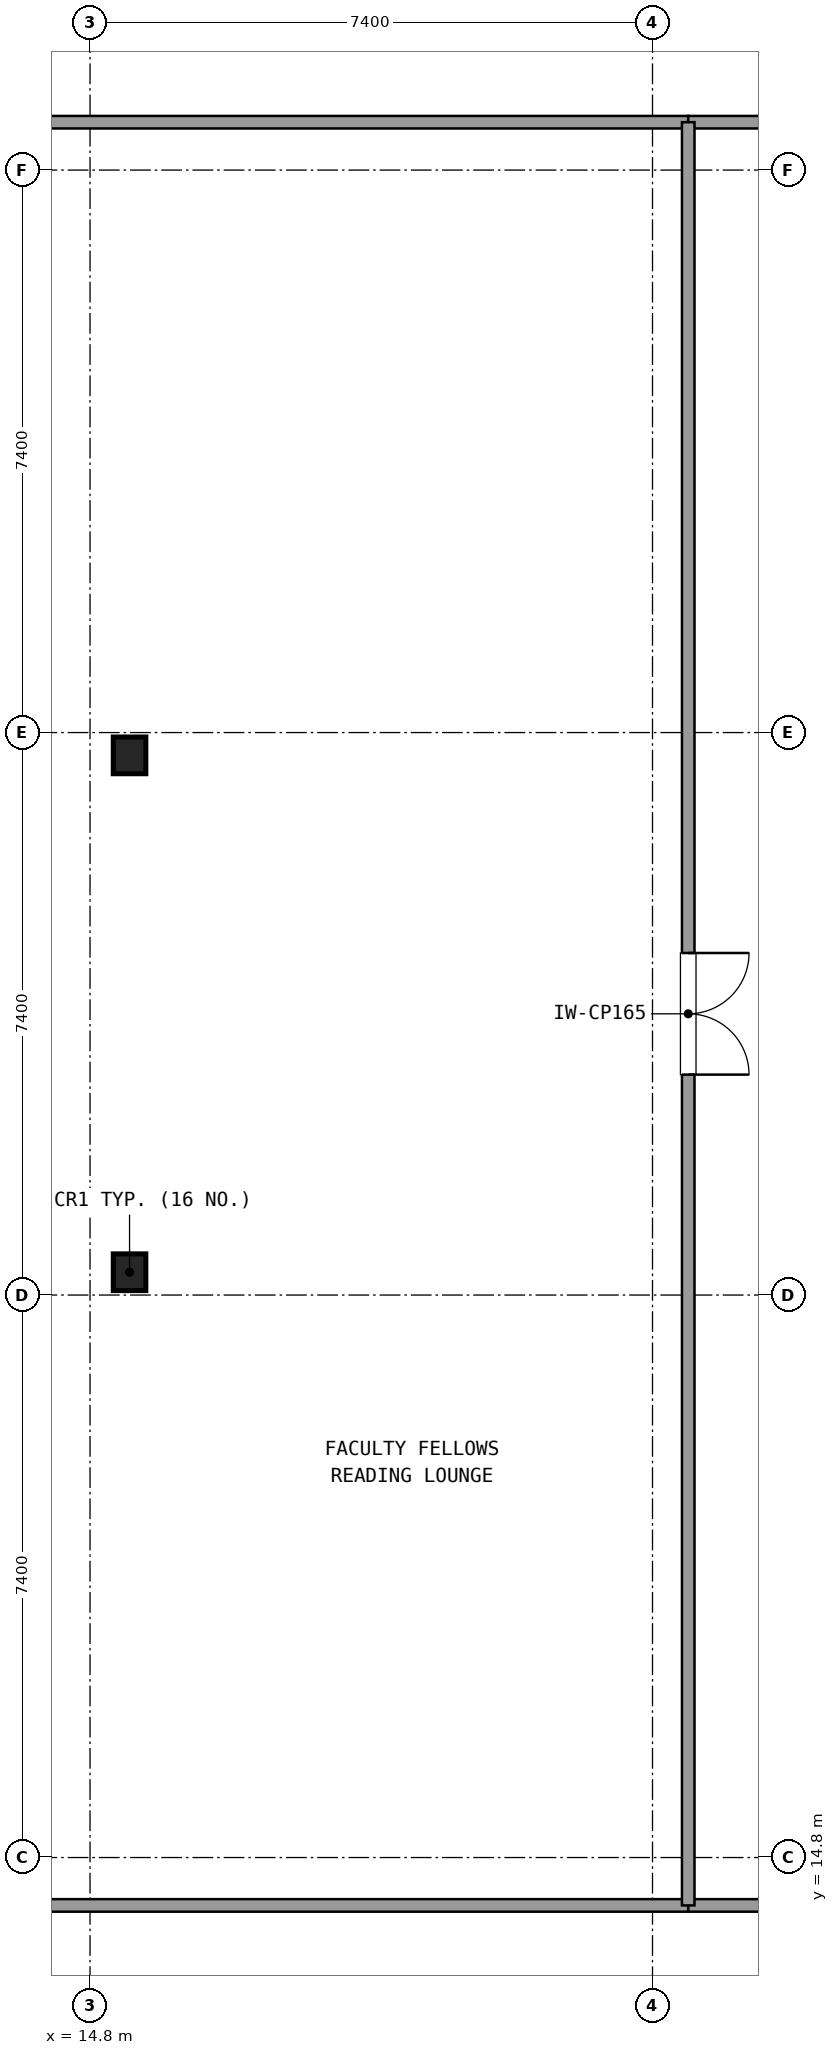
"""IFC4 building model, lengths in metres.
Left out: names, types, materials, properties, quantities, classifications, styles, units other than length and angle.
Written with IfcOpenShell. Run it as: python <this file> out.ifc"""

import sys

from ifc_helpers import new_model, si_unit, direction, frame, frame_2d, origin, origin_2d, place, context, subcontext, project, spatial, rectangle, i_section, extrude, element, fill, save


model = new_model("IFC4")
c1 = context("Model", 3, precision=1e-05, world=origin(), true_north=direction((0.0, 1.0)))
c2 = subcontext(c1, "Body", "Model", "MODEL_VIEW")
j1 = project(units=[si_unit("LENGTHUNIT", "METRE"), si_unit("PLANEANGLEUNIT", "RADIAN")], contexts=[c1])
p1 = place(None, origin())
s1 = spatial("IfcSite", under=j1, at=p1, CompositionType="ELEMENT")
p2 = place(p1, origin())
s2 = spatial("IfcBuilding", under=s1, at=p2, CompositionType="ELEMENT")
p3 = place(p2, frame((0.0, 0.0, 286.02)))
s3 = spatial("IfcBuildingStorey", under=s2, at=p3, CompositionType="ELEMENT", Elevation=286.02)
for number, where, z_axis, x_axis in (
    (1, (15.32, 22.5, 0.0), (0.0, 0.0, 1.0), (1.0, 0.0, 0.0)),
    (2, (15.32, 29.3, 0.0), (0.0, 0.0, 1.0), (1.0, 0.0, 0.0)),
):
    element("IfcColumn", number, at=place(p3, frame(where, z_axis=z_axis, x_axis=x_axis)), inside=s3, PredefinedType="COLUMN", context=c2, shape_type="SweptSolid", body=[
        extrude(i_section(OverallWidth=0.428, OverallDepth=0.483, WebThickness=0.042, FlangeThickness=0.068, at=origin_2d()), origin(), (0.0, 0.0, 1.0), 4.32),
    ])
for number, where, z_axis, x_axis in (
    (3, (14.1, 37.63, 0.0), (0.0, 0.0, 1.0), (1.0, 0.0, 0.0)),
    (4, (14.1, 14.17, 0.0), (0.0, 0.0, 1.0), (1.0, 0.0, 0.0)),
):
    element("IfcWall", number, at=place(p3, frame(where, z_axis=z_axis, x_axis=x_axis)), inside=s3, PredefinedType="PARTITIONING", context=c2, shape_type="SweptSolid", body=[
        extrude(rectangle(XDim=8.57, YDim=0.165, at=frame_2d((4.285, 0.0))), origin(), (0.0, 0.0, 1.0), 2.93),
    ])
p4 = place(p3, frame((22.67, 37.63, 0.0), z_axis=(0.0, 0.0, 1.0), x_axis=(1.0, 0.0, 0.0)))
e5 = element("IfcWall", 5, at=p4, inside=s3, PredefinedType="PARTITIONING", context=c2, shape_type="SweptSolid", body=[
    extrude(rectangle(XDim=19.65, YDim=0.165, at=frame_2d((9.825, 0.0))), origin(), (0.0, 0.0, 1.0), 2.93),
])
p5 = place(p4, frame((9.025, 0.0, 0.0)))
e6 = element("IfcOpeningElement", 6, at=p5, cuts=e5, PredefinedType="OPENING", context=c2, shape_type="SweptSolid", body=[
    extrude(rectangle(XDim=1.6, YDim=2.2, at=frame_2d((0.8, 1.1))), frame((0.0, 0.093, 0.0), z_axis=(0.0, -1.0, 0.0), x_axis=(1.0, 0.0, 0.0)), (0.0, 0.0, 1.0), 0.185),
])
p6 = place(p3, frame((22.67, 14.17, 0.0), z_axis=(0.0, 0.0, 1.0), x_axis=(1.0, 0.0, 0.0)))
e7 = element("IfcWall", 7, at=p6, inside=s3, PredefinedType="PARTITIONING", context=c2, shape_type="SweptSolid", body=[
    extrude(rectangle(XDim=8.319, YDim=0.165, at=frame_2d((4.16, 0.0))), origin(), (0.0, 0.0, 1.0), 2.93),
])
p7 = place(p6, frame((3.359, 0.0, 0.0)))
e8 = element("IfcOpeningElement", 8, at=p7, cuts=e7, PredefinedType="OPENING", context=c2, shape_type="SweptSolid", body=[
    extrude(rectangle(XDim=1.6, YDim=2.2, at=frame_2d((0.8, 1.1))), frame((0.0, 0.093, 0.0), z_axis=(0.0, -1.0, 0.0), x_axis=(1.0, 0.0, 0.0)), (0.0, 0.0, 1.0), 0.185),
])
p8 = place(p3, frame((22.67, 14.17, 0.0), z_axis=(0.0, 0.0, 1.0), x_axis=(0.0, 1.0, 0.0)))
e9 = element("IfcWall", 9, at=p8, inside=s3, PredefinedType="PARTITIONING", context=c2, shape_type="SweptSolid", body=[
    extrude(rectangle(XDim=23.46, YDim=0.165, at=frame_2d((11.73, 0.0))), origin(), (0.0, 0.0, 1.0), 2.93),
])
p9 = place(p8, frame((10.93, 0.0, 0.0)))
e10 = element("IfcOpeningElement", 10, at=p9, cuts=e9, PredefinedType="OPENING", context=c2, shape_type="SweptSolid", body=[
    extrude(rectangle(XDim=1.6, YDim=2.2, at=frame_2d((0.8, 1.1))), frame((0.0, 0.093, 0.0), z_axis=(0.0, -1.0, 0.0), x_axis=(1.0, 0.0, 0.0)), (0.0, 0.0, 1.0), 0.185),
])
p10 = place(p9, frame((1.6, 0.0, 0.0), z_axis=(0.0, 0.0, 1.0), x_axis=(-1.0, 0.0, 0.0)))
e11 = element("IfcDoor", 11, at=p10, inside=s3, OperationType="DOUBLE_DOOR_SINGLE_SWING", PredefinedType="DOOR", context=c2, shape_type="SweptSolid", body=[
    extrude(rectangle(XDim=1.6, YDim=2.2, at=frame_2d((0.8, 1.1))), frame((0.0, 0.025, 0.0), z_axis=(0.0, -1.0, 0.0), x_axis=(1.0, 0.0, 0.0)), (0.0, 0.0, 1.0), 0.05),
])
fill(e10, e11)
save(model, sys.argv[1])
